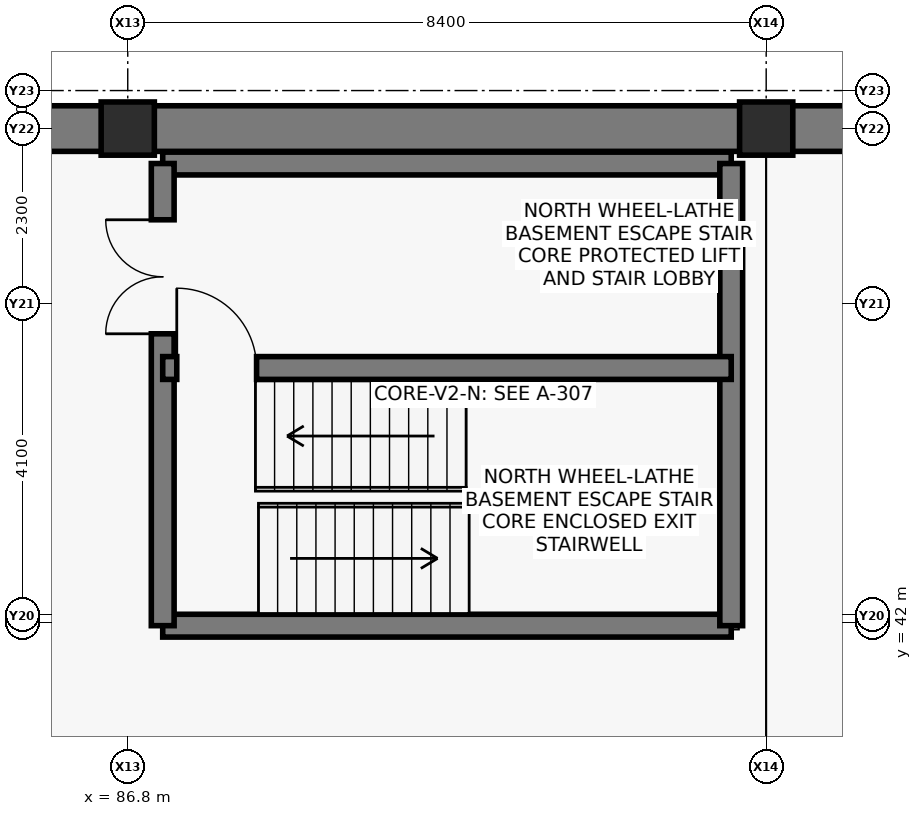
"""IFC4 building model, lengths in metres.
Left out: names, types, materials, properties, quantities, classifications, styles, units other than length and angle.
Written with IfcOpenShell. Run it as: python <this file> out.ifc"""

import sys

from ifc_helpers import new_model, si_unit, direction, frame, frame_2d, origin, origin_2d, place, context, subcontext, project, spatial, rectangle, extrude, element, fill, save


model = new_model("IFC4")
c1 = context("Model", 3, precision=1e-05, world=origin(), true_north=direction((0.0, 1.0)))
c2 = subcontext(c1, "Body", "Model", "MODEL_VIEW")
j1 = project(units=[si_unit("LENGTHUNIT", "METRE"), si_unit("PLANEANGLEUNIT", "RADIAN")], contexts=[c1])
p1 = place(None, origin())
s1 = spatial("IfcSite", under=j1, at=p1, CompositionType="ELEMENT")
p2 = place(p1, origin())
s2 = spatial("IfcBuilding", under=s1, at=p2, CompositionType="ELEMENT")
p3 = place(p2, frame((0.0, 0.0, -4.0)))
s3 = spatial("IfcBuildingStorey", under=s2, at=p3, CompositionType="ELEMENT", Elevation=-4.0)
for number, where, z_axis, x_axis in (
    (1, (86.8, 48.5, -0.6), (0.0, 0.0, 1.0), (1.0, 0.0, 0.0)),
    (2, (95.2, 48.5, -0.6), (0.0, 0.0, 1.0), (1.0, 0.0, 0.0)),
):
    element("IfcColumn", number, at=place(p3, frame(where, z_axis=z_axis, x_axis=x_axis)), inside=s3, PredefinedType="COLUMN", context=c2, shape_type="SweptSolid", body=[
        extrude(rectangle(XDim=0.7, YDim=0.7, at=origin_2d()), origin(), (0.0, 0.0, 1.0), 4.25),
    ])
for number, where, z_axis, x_axis in (
    (3, (53.2, 48.5, -0.6), (0.0, 0.0, 1.0), (1.0, 0.0, 0.0)),
    (4, (95.2, 48.5, -0.6), (0.0, 0.0, 1.0), (1.0, 0.0, 0.0)),
):
    element("IfcWall", number, at=place(p3, frame(where, z_axis=z_axis, x_axis=x_axis)), inside=s3, PredefinedType="USERDEFINED", context=c2, shape_type="SweptSolid", body=[
        extrude(rectangle(XDim=42.0, YDim=0.6, at=frame_2d((21.0, 0.0))), origin(), (0.0, 0.0, 1.0), 4.25),
    ])
for number, where, z_axis, x_axis in (
    (5, (87.26, 41.96, -0.6), (0.0, 0.0, 1.0), (1.0, 0.0, 0.0)),
    (6, (87.26, 48.04, -0.6), (0.0, 0.0, 1.0), (1.0, 0.0, 0.0)),
):
    element("IfcWall", number, at=place(p3, frame(where, z_axis=z_axis, x_axis=x_axis)), inside=s3, PredefinedType="SHEAR", context=c2, shape_type="SweptSolid", body=[
        extrude(rectangle(XDim=7.48, YDim=0.3, at=frame_2d((3.74, 0.0))), origin(), (0.0, 0.0, 1.0), 4.25),
    ])
p4 = place(p3, frame((87.26, 41.96, -0.6), z_axis=(0.0, 0.0, 1.0), x_axis=(0.0, 1.0, 0.0)))
e7 = element("IfcWall", 7, at=p4, inside=s3, PredefinedType="SHEAR", context=c2, shape_type="SweptSolid", body=[
    extrude(rectangle(XDim=6.08, YDim=0.3, at=frame_2d((3.04, 0.0))), origin(), (0.0, 0.0, 1.0), 4.25),
])
p5 = place(p4, frame((3.84, 0.0, 0.6)))
e8 = element("IfcOpeningElement", 8, at=p5, cuts=e7, PredefinedType="OPENING", context=c2, shape_type="SweptSolid", body=[
    extrude(rectangle(XDim=1.5, YDim=2.2, at=frame_2d((0.75, 1.1))), frame((0.0, 0.16, 0.0), z_axis=(0.0, -1.0, 0.0), x_axis=(1.0, 0.0, 0.0)), (0.0, 0.0, 1.0), 0.32),
])
p6 = place(p3, frame((94.74, 41.96, -0.6), z_axis=(0.0, 0.0, 1.0), x_axis=(0.0, 1.0, 0.0)))
e9 = element("IfcWall", 9, at=p6, inside=s3, PredefinedType="SHEAR", context=c2, shape_type="SweptSolid", body=[
    extrude(rectangle(XDim=6.08, YDim=0.3, at=frame_2d((3.04, 0.0))), origin(), (0.0, 0.0, 1.0), 4.25),
])
p7 = place(p3, frame((87.26, 45.35, -0.6), z_axis=(0.0, 0.0, 1.0), x_axis=(1.0, 0.0, 0.0)))
e10 = element("IfcWall", 10, at=p7, inside=s3, PredefinedType="SHEAR", context=c2, shape_type="SweptSolid", body=[
    extrude(rectangle(XDim=7.48, YDim=0.3, at=frame_2d((3.74, 0.0))), origin(), (0.0, 0.0, 1.0), 4.25),
])
p8 = place(p7, frame((0.185, 0.0, 0.6)))
e11 = element("IfcOpeningElement", 11, at=p8, cuts=e10, PredefinedType="OPENING", context=c2, shape_type="SweptSolid", body=[
    extrude(rectangle(XDim=1.05, YDim=2.15, at=frame_2d((0.525, 1.075))), frame((0.0, 0.16, 0.0), z_axis=(0.0, -1.0, 0.0), x_axis=(1.0, 0.0, 0.0)), (0.0, 0.0, 1.0), 0.32),
])
p9 = place(p8, origin())
e12 = element("IfcDoor", 12, at=p9, inside=s3, OperationType="SINGLE_SWING_LEFT", PredefinedType="DOOR", context=c2, shape_type="SweptSolid", body=[
    extrude(rectangle(XDim=1.05, YDim=2.15, at=frame_2d((0.525, 1.075))), frame((0.0, 0.025, 0.0), z_axis=(0.0, -1.0, 0.0), x_axis=(1.0, 0.0, 0.0)), (0.0, 0.0, 1.0), 0.05),
])
fill(e11, e12)
p10 = place(p5, origin())
e13 = element("IfcDoor", 13, at=p10, inside=s3, OperationType="DOUBLE_DOOR_SINGLE_SWING", PredefinedType="DOOR", context=c2, shape_type="SweptSolid", body=[
    extrude(rectangle(XDim=1.5, YDim=2.2, at=frame_2d((0.75, 1.1))), frame((0.0, 0.025, 0.0), z_axis=(0.0, -1.0, 0.0), x_axis=(1.0, 0.0, 0.0)), (0.0, 0.0, 1.0), 0.05),
])
fill(e8, e13)
save(model, sys.argv[1])
